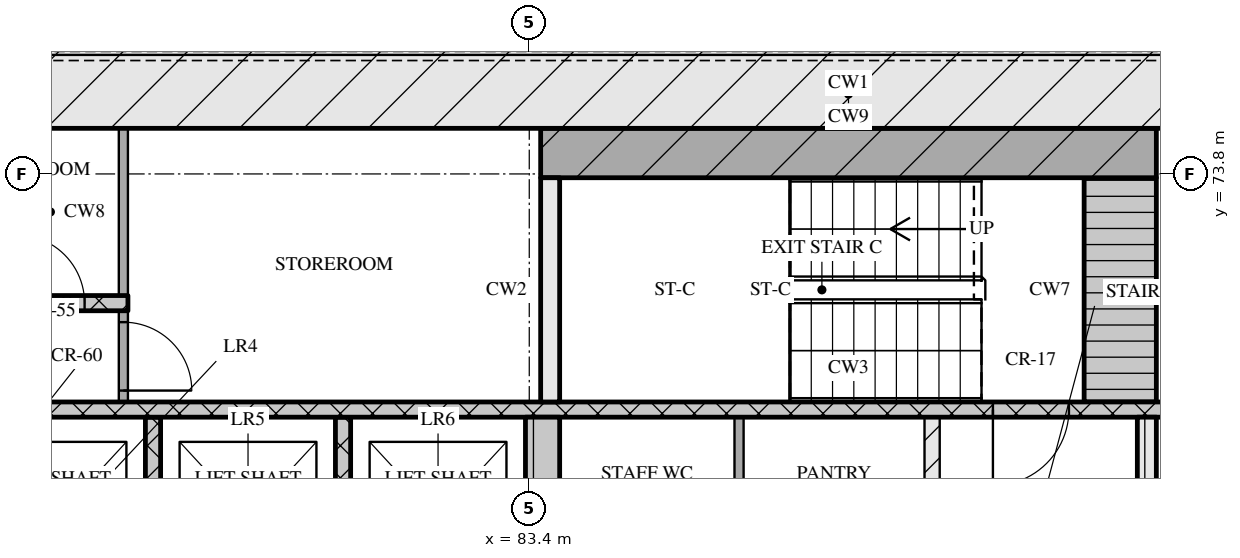
"""IFC4 building model, lengths in metres.
Left out: names, types, materials, properties, quantities, classifications, styles, units other than length and angle.
Written with IfcOpenShell. Run it as: python <this file> out.ifc"""

import sys

from ifc_helpers import new_model, si_unit, direction, frame, frame_2d, origin, place, context, subcontext, project, spatial, rectangle, extrude, element, fill, save


model = new_model("IFC4")
c1 = context("Model", 3, precision=1e-05, world=origin(), true_north=direction((0.0, 1.0)))
c2 = subcontext(c1, "Body", "Model", "MODEL_VIEW")
j1 = project(units=[si_unit("LENGTHUNIT", "METRE"), si_unit("PLANEANGLEUNIT", "RADIAN")], contexts=[c1])
p1 = place(None, origin())
s1 = spatial("IfcSite", under=j1, at=p1, CompositionType="ELEMENT")
p2 = place(p1, origin())
s2 = spatial("IfcBuilding", under=s1, at=p2, CompositionType="ELEMENT")
p3 = place(p2, frame((0.0, 0.0, 76.8)))
s3 = spatial("IfcBuildingStorey", under=s2, at=p3, CompositionType="ELEMENT", Elevation=76.8)
p4 = place(p3, frame((66.6, 75.0, 0.0), z_axis=(0.0, 0.0, 1.0), x_axis=(1.0, 0.0, 0.0)))
e1 = element("IfcWall", 1, at=p4, inside=s3, PredefinedType="SOLIDWALL", context=c2, shape_type="SweptSolid", body=[
    extrude(rectangle(XDim=42.0, YDim=1.2, at=frame_2d((21.0, 0.0))), origin(), (0.0, 0.0, 1.0), 3.32),
])
for number, where, z_axis, x_axis in (
    (2, (78.45, 68.0, 0.0), (0.0, 0.0, 1.0), (0.0, 1.0, 0.0)),
    (3, (80.95, 68.0, 0.0), (0.0, 0.0, 1.0), (0.0, 1.0, 0.0)),
):
    element("IfcWall", number, at=place(p3, frame(where, z_axis=z_axis, x_axis=x_axis)), inside=s3, PredefinedType="SOLIDWALL", context=c2, shape_type="SweptSolid", body=[
        extrude(rectangle(XDim=2.6, YDim=0.2, at=frame_2d((1.3, 0.0))), origin(), (0.0, 0.0, 1.0), 3.32),
    ])
p5 = place(p3, frame((83.575, 68.0, 0.0), z_axis=(0.0, 0.0, 1.0), x_axis=(0.0, 1.0, 0.0)))
e4 = element("IfcWall", 4, at=p5, inside=s3, PredefinedType="SOLIDWALL", context=c2, shape_type="SweptSolid", body=[
    extrude(rectangle(XDim=2.6, YDim=0.45, at=frame_2d((1.3, 0.0))), origin(), (0.0, 0.0, 1.0), 3.32),
])
p6 = place(p3, frame((86.16, 68.0, 0.0), z_axis=(0.0, 0.0, 1.0), x_axis=(0.0, 1.0, 0.0)))
e5 = element("IfcWall", 5, at=p6, inside=s3, PredefinedType="PARTITIONING", context=c2, shape_type="SweptSolid", body=[
    extrude(rectangle(XDim=2.6, YDim=0.12, at=frame_2d((1.3, 0.0))), origin(), (0.0, 0.0, 1.0), 3.32),
])
p7 = place(p3, frame((88.7, 68.0, 0.0), z_axis=(0.0, 0.0, 1.0), x_axis=(0.0, 1.0, 0.0)))
e6 = element("IfcWall", 6, at=p7, inside=s3, PredefinedType="PARTITIONING", context=c2, shape_type="SweptSolid", body=[
    extrude(rectangle(XDim=2.6, YDim=0.2, at=frame_2d((1.3, 0.0))), origin(), (0.0, 0.0, 1.0), 3.32),
])
p8 = place(p3, frame((91.525, 68.0, 0.0), z_axis=(0.0, 0.0, 1.0), x_axis=(0.0, 1.0, 0.0)))
e7 = element("IfcWall", 7, at=p8, inside=s3, PredefinedType="SOLIDWALL", context=c2, shape_type="SweptSolid", body=[
    extrude(rectangle(XDim=2.6, YDim=0.25, at=frame_2d((1.3, 0.0))), origin(), (0.0, 0.0, 1.0), 3.32),
])
p9 = place(p3, frame((67.8, 70.7, 0.0), z_axis=(0.0, 0.0, 1.0), x_axis=(1.0, 0.0, 0.0)))
e8 = element("IfcWall", 8, at=p9, inside=s3, PredefinedType="SOLIDWALL", context=c2, shape_type="SweptSolid", body=[
    extrude(rectangle(XDim=39.6, YDim=0.2, at=frame_2d((19.8, 0.0))), origin(), (0.0, 0.0, 1.0), 3.32),
])
p10 = place(p9, frame((0.65, 0.0, 0.0)))
e9 = element("IfcOpeningElement", 9, at=p10, cuts=e8, PredefinedType="OPENING", context=c2, shape_type="SweptSolid", body=[
    extrude(rectangle(XDim=1.1, YDim=2.1, at=frame_2d((0.55, 1.05))), frame((0.0, 0.11, 0.0), z_axis=(0.0, -1.0, 0.0), x_axis=(1.0, 0.0, 0.0)), (0.0, 0.0, 1.0), 0.22),
])
p11 = place(p9, frame((3.25, 0.0, 0.0)))
e10 = element("IfcOpeningElement", 10, at=p11, cuts=e8, PredefinedType="OPENING", context=c2, shape_type="SweptSolid", body=[
    extrude(rectangle(XDim=1.1, YDim=2.1, at=frame_2d((0.55, 1.05))), frame((0.0, 0.11, 0.0), z_axis=(0.0, -1.0, 0.0), x_axis=(1.0, 0.0, 0.0)), (0.0, 0.0, 1.0), 0.22),
])
p12 = place(p9, frame((5.9, 0.0, 0.0)))
e11 = element("IfcOpeningElement", 11, at=p12, cuts=e8, PredefinedType="OPENING", context=c2, shape_type="SweptSolid", body=[
    extrude(rectangle(XDim=1.0, YDim=2.1, at=frame_2d((0.5, 1.05))), frame((0.0, 0.11, 0.0), z_axis=(0.0, -1.0, 0.0), x_axis=(1.0, 0.0, 0.0)), (0.0, 0.0, 1.0), 0.22),
])
p13 = place(p9, frame((21.7, 0.0, 0.0)))
e12 = element("IfcOpeningElement", 12, at=p13, cuts=e8, PredefinedType="OPENING", context=c2, shape_type="SweptSolid", body=[
    extrude(rectangle(XDim=1.0, YDim=2.1, at=frame_2d((0.5, 1.05))), frame((0.0, 0.11, 0.0), z_axis=(0.0, -1.0, 0.0), x_axis=(1.0, 0.0, 0.0)), (0.0, 0.0, 1.0), 0.22),
])
p14 = place(p9, frame((32.7, 0.0, 0.0)))
e13 = element("IfcOpeningElement", 13, at=p14, cuts=e8, PredefinedType="OPENING", context=c2, shape_type="SweptSolid", body=[
    extrude(rectangle(XDim=1.0, YDim=2.1, at=frame_2d((0.5, 1.05))), frame((0.0, 0.11, 0.0), z_axis=(0.0, -1.0, 0.0), x_axis=(1.0, 0.0, 0.0)), (0.0, 0.0, 1.0), 0.22),
])
p15 = place(p9, frame((35.25, 0.0, 0.0)))
e14 = element("IfcOpeningElement", 14, at=p15, cuts=e8, PredefinedType="OPENING", context=c2, shape_type="SweptSolid", body=[
    extrude(rectangle(XDim=1.1, YDim=2.1, at=frame_2d((0.55, 1.05))), frame((0.0, 0.11, 0.0), z_axis=(0.0, -1.0, 0.0), x_axis=(1.0, 0.0, 0.0)), (0.0, 0.0, 1.0), 0.22),
])
p16 = place(p9, frame((37.85, 0.0, 0.0)))
e15 = element("IfcOpeningElement", 15, at=p16, cuts=e8, PredefinedType="OPENING", context=c2, shape_type="SweptSolid", body=[
    extrude(rectangle(XDim=1.1, YDim=2.1, at=frame_2d((0.55, 1.05))), frame((0.0, 0.11, 0.0), z_axis=(0.0, -1.0, 0.0), x_axis=(1.0, 0.0, 0.0)), (0.0, 0.0, 1.0), 0.22),
])
p17 = place(p3, frame((78.06, 70.8, 0.0), z_axis=(0.0, 0.0, 1.0), x_axis=(0.0, 1.0, 0.0)))
e16 = element("IfcWall", 16, at=p17, inside=s3, PredefinedType="PARTITIONING", context=c2, shape_type="SweptSolid", body=[
    extrude(rectangle(XDim=1.2, YDim=0.12, at=frame_2d((0.6, 0.0))), origin(), (0.0, 0.0, 1.0), 3.32),
])
p18 = place(p17, frame((0.15, 0.0, 0.0)))
e17 = element("IfcOpeningElement", 17, at=p18, cuts=e16, PredefinedType="OPENING", context=c2, shape_type="SweptSolid", body=[
    extrude(rectangle(XDim=0.9, YDim=2.1, at=frame_2d((0.45, 1.05))), frame((0.0, 0.07, 0.0), z_axis=(0.0, -1.0, 0.0), x_axis=(1.0, 0.0, 0.0)), (0.0, 0.0, 1.0), 0.14),
])
p19 = place(p3, frame((83.675, 70.8, 0.0), z_axis=(0.0, 0.0, 1.0), x_axis=(0.0, 1.0, 0.0)))
e18 = element("IfcWall", 18, at=p19, inside=s3, PredefinedType="SOLIDWALL", context=c2, shape_type="SweptSolid", body=[
    extrude(rectangle(XDim=2.95, YDim=0.25, at=frame_2d((1.475, 0.0))), origin(), (0.0, 0.0, 1.0), 3.32),
])
p20 = place(p3, frame((91.175, 70.8, 0.0), z_axis=(0.0, 0.0, 1.0), x_axis=(0.0, 1.0, 0.0)))
e19 = element("IfcWall", 19, at=p20, inside=s3, PredefinedType="SOLIDWALL", context=c2, shape_type="SweptSolid", body=[
    extrude(rectangle(XDim=2.95, YDim=0.95, at=frame_2d((1.475, 0.0))), origin(), (0.0, 0.0, 1.0), 3.32),
])
p21 = place(p3, frame((72.8, 72.1, 0.0), z_axis=(0.0, 0.0, 1.0), x_axis=(1.0, 0.0, 0.0)))
e20 = element("IfcWall", 20, at=p21, inside=s3, PredefinedType="SOLIDWALL", context=c2, shape_type="SweptSolid", body=[
    extrude(rectangle(XDim=5.32, YDim=0.2, at=frame_2d((2.66, 0.0))), origin(), (0.0, 0.0, 1.0), 3.32),
])
p22 = place(p21, frame((1.25, 0.0, 0.0)))
e21 = element("IfcOpeningElement", 21, at=p22, cuts=e20, PredefinedType="OPENING", context=c2, shape_type="SweptSolid", body=[
    extrude(rectangle(XDim=0.9, YDim=2.1, at=frame_2d((0.45, 1.05))), frame((0.0, 0.11, 0.0), z_axis=(0.0, -1.0, 0.0), x_axis=(1.0, 0.0, 0.0)), (0.0, 0.0, 1.0), 0.22),
])
p23 = place(p21, frame((3.85, 0.0, 0.0)))
e22 = element("IfcOpeningElement", 22, at=p23, cuts=e20, PredefinedType="OPENING", context=c2, shape_type="SweptSolid", body=[
    extrude(rectangle(XDim=0.9, YDim=2.1, at=frame_2d((0.45, 1.05))), frame((0.0, 0.11, 0.0), z_axis=(0.0, -1.0, 0.0), x_axis=(1.0, 0.0, 0.0)), (0.0, 0.0, 1.0), 0.22),
])
p24 = place(p3, frame((78.06, 72.2, 0.0), z_axis=(0.0, 0.0, 1.0), x_axis=(0.0, 1.0, 0.0)))
e23 = element("IfcWall", 23, at=p24, inside=s3, PredefinedType="PARTITIONING", context=c2, shape_type="SweptSolid", body=[
    extrude(rectangle(XDim=2.2, YDim=0.12, at=frame_2d((1.1, 0.0))), origin(), (0.0, 0.0, 1.0), 3.32),
])
p25 = place(p3, frame((83.55, 74.075, 0.0), z_axis=(0.0, 0.0, 1.0), x_axis=(1.0, 0.0, 0.0)))
e24 = element("IfcWall", 24, at=p25, inside=s3, PredefinedType="SOLIDWALL", context=c2, shape_type="SweptSolid", body=[
    extrude(rectangle(XDim=8.1, YDim=0.65, at=frame_2d((4.05, 0.0))), origin(), (0.0, 0.0, 1.0), 3.32),
])
p26 = place(p13, origin())
e25 = element("IfcDoor", 25, at=p26, inside=s3, OperationType="SINGLE_SWING_RIGHT", PredefinedType="DOOR", context=c2, shape_type="SweptSolid", body=[
    extrude(rectangle(XDim=1.0, YDim=2.1, at=frame_2d((0.5, 1.05))), frame((0.0, 0.025, 0.0), z_axis=(0.0, -1.0, 0.0), x_axis=(1.0, 0.0, 0.0)), (0.0, 0.0, 1.0), 0.05),
])
fill(e12, e25)
p27 = place(p18, origin())
e26 = element("IfcDoor", 26, at=p27, inside=s3, OperationType="SINGLE_SWING_RIGHT", PredefinedType="DOOR", context=c2, shape_type="SweptSolid", body=[
    extrude(rectangle(XDim=0.9, YDim=2.1, at=frame_2d((0.45, 1.05))), frame((0.0, 0.025, 0.0), z_axis=(0.0, -1.0, 0.0), x_axis=(1.0, 0.0, 0.0)), (0.0, 0.0, 1.0), 0.05),
])
fill(e17, e26)
p28 = place(p23, origin())
e27 = element("IfcDoor", 27, at=p28, inside=s3, OperationType="SINGLE_SWING_LEFT", PredefinedType="DOOR", context=c2, shape_type="SweptSolid", body=[
    extrude(rectangle(XDim=0.9, YDim=2.1, at=frame_2d((0.45, 1.05))), frame((0.0, 0.025, 0.0), z_axis=(0.0, -1.0, 0.0), x_axis=(1.0, 0.0, 0.0)), (0.0, 0.0, 1.0), 0.05),
])
fill(e22, e27)
save(model, sys.argv[1])
